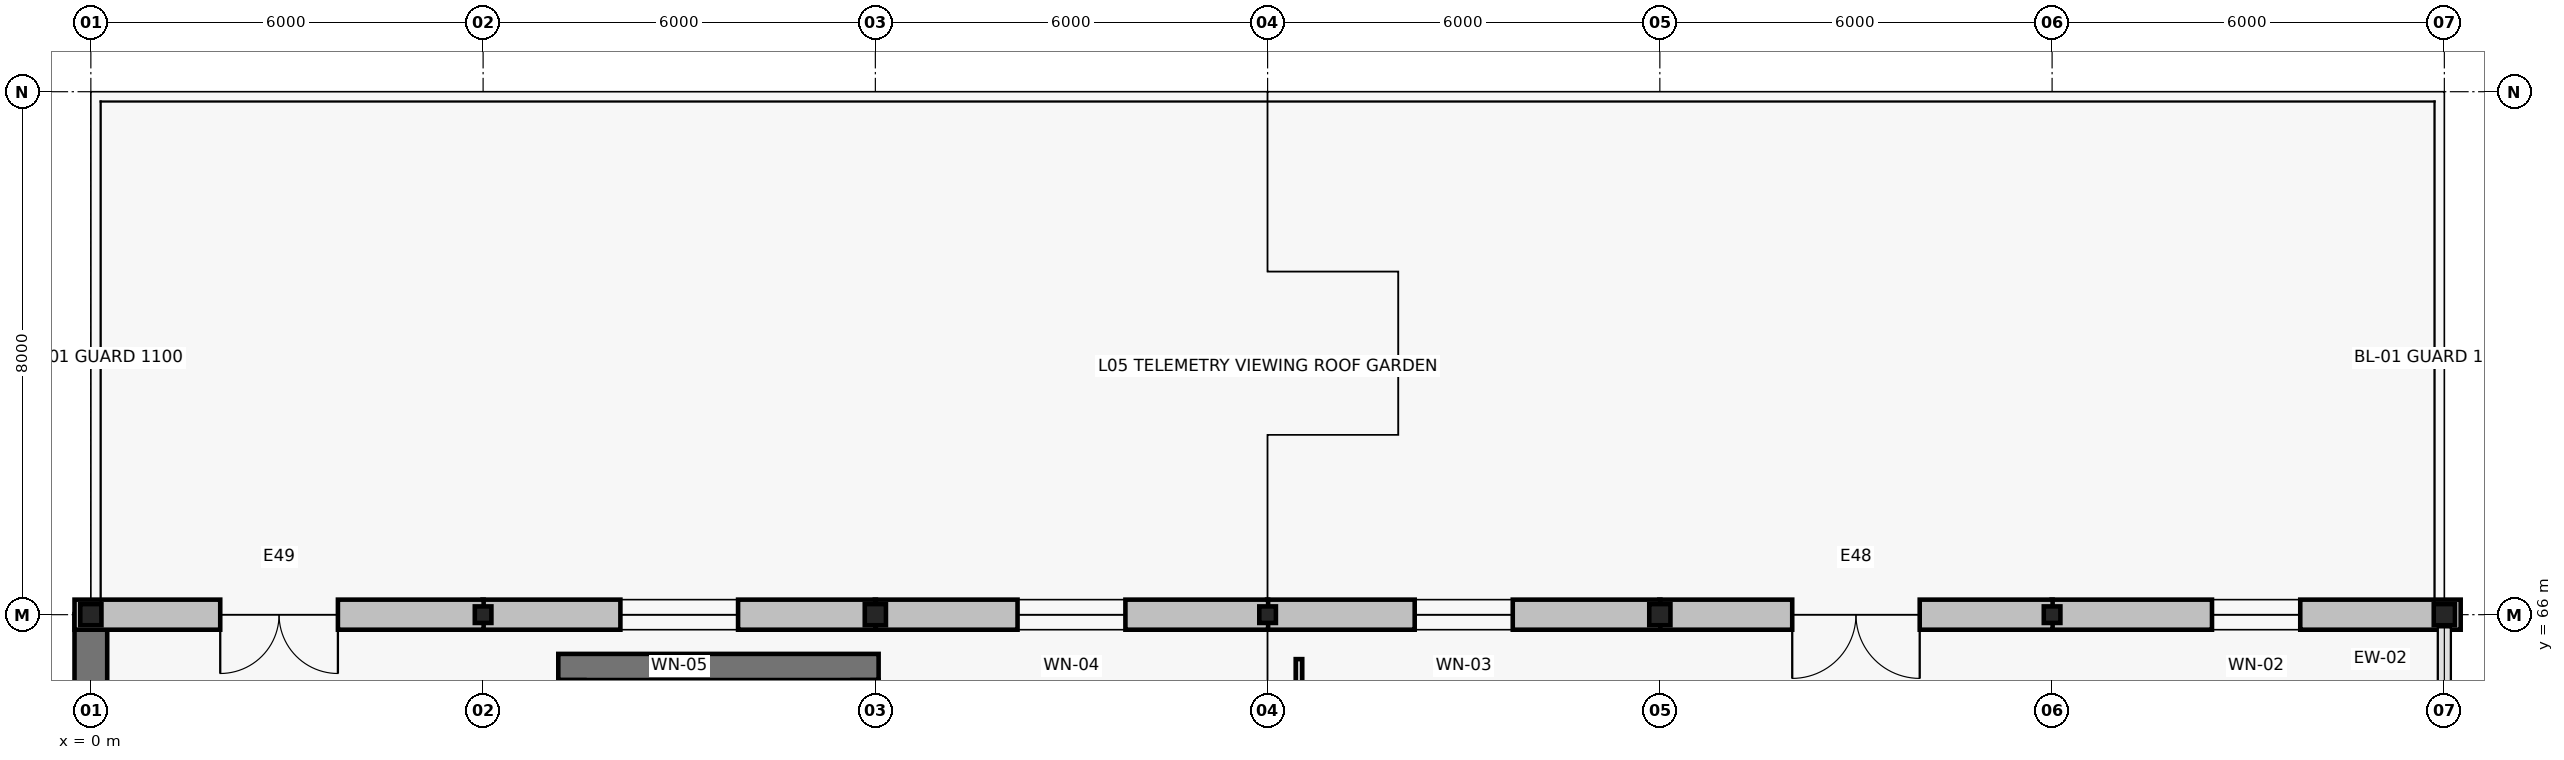
"""IFC4 building model, lengths in metres.
Left out: names, types, materials, properties, quantities, classifications, styles, units other than length and angle.
Written with IfcOpenShell. Run it as: python <this file> out.ifc"""

import sys

from ifc_helpers import new_model, si_unit, direction, frame, frame_2d, origin, origin_2d, place, context, subcontext, project, spatial, rectangle, hollow_circle, i_section, extrude, element, fill, save


model = new_model("IFC4")
c1 = context("Model", 3, precision=1e-05, world=origin(), true_north=direction((0.0, 1.0)))
c2 = subcontext(c1, "Body", "Model", "MODEL_VIEW")
j1 = project(units=[si_unit("LENGTHUNIT", "METRE"), si_unit("PLANEANGLEUNIT", "RADIAN")], contexts=[c1])
p1 = place(None, origin())
s1 = spatial("IfcSite", under=j1, at=p1, CompositionType="ELEMENT")
p2 = place(p1, origin())
s2 = spatial("IfcBuilding", under=s1, at=p2, CompositionType="ELEMENT")
p3 = place(p2, frame((0.0, 0.0, 19.4)))
s3 = spatial("IfcBuildingStorey", under=s2, at=p3, CompositionType="ELEMENT", Elevation=19.4)
p4 = place(p3, frame((0.0, 66.0, 0.0), z_axis=(0.0, 0.0, 1.0), x_axis=(1.0, 0.0, 0.0)))
e1 = element("IfcColumn", 1, at=p4, inside=s3, PredefinedType="COLUMN", context=c2, shape_type="SweptSolid", body=[
    extrude(hollow_circle(Radius=0.162, WallThickness=0.013, at=origin_2d()), origin(), (0.0, 0.0, 1.0), 4.2),
])
p5 = place(p3, frame((6.0, 66.0, 0.0), z_axis=(0.0, 0.0, 1.0), x_axis=(1.0, 0.0, 0.0)))
e2 = element("IfcColumn", 2, at=p5, inside=s3, PredefinedType="COLUMN", context=c2, shape_type="SweptSolid", body=[
    extrude(i_section(OverallWidth=0.254, OverallDepth=0.253, WebThickness=0.009, FlangeThickness=0.014, FilletRadius=0.012, at=origin_2d()), origin(), (0.0, 0.0, 1.0), 4.2),
])
p6 = place(p3, frame((12.0, 66.0, 0.0), z_axis=(0.0, 0.0, 1.0), x_axis=(1.0, 0.0, 0.0)))
e3 = element("IfcColumn", 3, at=p6, inside=s3, PredefinedType="COLUMN", context=c2, shape_type="SweptSolid", body=[
    extrude(hollow_circle(Radius=0.162, WallThickness=0.013, at=origin_2d()), origin(), (0.0, 0.0, 1.0), 4.2),
])
p7 = place(p3, frame((18.0, 66.0, 0.0), z_axis=(0.0, 0.0, 1.0), x_axis=(1.0, 0.0, 0.0)))
e4 = element("IfcColumn", 4, at=p7, inside=s3, PredefinedType="COLUMN", context=c2, shape_type="SweptSolid", body=[
    extrude(i_section(OverallWidth=0.254, OverallDepth=0.253, WebThickness=0.009, FlangeThickness=0.014, FilletRadius=0.012, at=origin_2d()), origin(), (0.0, 0.0, 1.0), 4.2),
])
p8 = place(p3, frame((24.0, 66.0, 0.0), z_axis=(0.0, 0.0, 1.0), x_axis=(1.0, 0.0, 0.0)))
e5 = element("IfcColumn", 5, at=p8, inside=s3, PredefinedType="COLUMN", context=c2, shape_type="SweptSolid", body=[
    extrude(hollow_circle(Radius=0.162, WallThickness=0.013, at=origin_2d()), origin(), (0.0, 0.0, 1.0), 4.2),
])
p9 = place(p3, frame((30.0, 66.0, 0.0), z_axis=(0.0, 0.0, 1.0), x_axis=(1.0, 0.0, 0.0)))
e6 = element("IfcColumn", 6, at=p9, inside=s3, PredefinedType="COLUMN", context=c2, shape_type="SweptSolid", body=[
    extrude(i_section(OverallWidth=0.254, OverallDepth=0.253, WebThickness=0.009, FlangeThickness=0.014, FilletRadius=0.012, at=origin_2d()), origin(), (0.0, 0.0, 1.0), 4.2),
])
p10 = place(p3, frame((36.0, 66.0, 0.0), z_axis=(0.0, 0.0, 1.0), x_axis=(1.0, 0.0, 0.0)))
e7 = element("IfcColumn", 7, at=p10, inside=s3, PredefinedType="COLUMN", context=c2, shape_type="SweptSolid", body=[
    extrude(hollow_circle(Radius=0.162, WallThickness=0.013, at=origin_2d()), origin(), (0.0, 0.0, 1.0), 4.2),
])
p11 = place(p3, frame((0.0, 4.492, 0.0), z_axis=(0.0, 0.0, 1.0), x_axis=(0.0, 1.0, 0.0)))
e8 = element("IfcWall", 8, at=p11, inside=s3, PredefinedType="SOLIDWALL", context=c2, shape_type="SweptSolid", body=[
    extrude(rectangle(XDim=61.516, YDim=0.5, at=frame_2d((30.758, 0.0))), origin(), (0.0, 0.0, 1.0), 3.88),
])
p12 = place(p3, frame((36.25, 66.0, 0.0), z_axis=(0.0, 0.0, 1.0), x_axis=(-1.0, 0.0, 0.0)))
e9 = element("IfcWall", 9, at=p12, inside=s3, PredefinedType="SOLIDWALL", context=c2, shape_type="SweptSolid", body=[
    extrude(rectangle(XDim=6.258, YDim=0.46, at=frame_2d((3.129, 0.0))), origin(), (0.0, 0.0, 1.0), 3.157),
])
p13 = place(p12, frame((2.454, 0.0, 0.9)))
e10 = element("IfcOpeningElement", 10, at=p13, cuts=e9, PredefinedType="OPENING", context=c2, shape_type="SweptSolid", body=[
    extrude(rectangle(XDim=1.35, YDim=1.8, at=frame_2d((0.675, 0.9))), frame((0.0, 0.245, 0.0), z_axis=(0.0, -1.0, 0.0), x_axis=(1.0, 0.0, 0.0)), (0.0, 0.0, 1.0), 0.49),
])
p14 = place(p3, frame((30.008, 66.0, 0.0), z_axis=(0.0, 0.0, 1.0), x_axis=(-1.0, 0.0, 0.0)))
e11 = element("IfcWall", 11, at=p14, inside=s3, PredefinedType="SOLIDWALL", context=c2, shape_type="SweptSolid", body=[
    extrude(rectangle(XDim=6.016, YDim=0.46, at=frame_2d((3.008, 0.0))), origin(), (0.0, 0.0, 1.0), 3.157),
])
p15 = place(p14, frame((2.033, 0.0, 0.0)))
e12 = element("IfcOpeningElement", 12, at=p15, cuts=e11, PredefinedType="OPENING", context=c2, shape_type="SweptSolid", body=[
    extrude(rectangle(XDim=1.95, YDim=2.3, at=frame_2d((0.975, 1.15))), frame((0.0, 0.245, 0.0), z_axis=(0.0, -1.0, 0.0), x_axis=(1.0, 0.0, 0.0)), (0.0, 0.0, 1.0), 0.49),
])
p16 = place(p3, frame((24.008, 66.0, 0.0), z_axis=(0.0, 0.0, 1.0), x_axis=(-1.0, 0.0, 0.0)))
e13 = element("IfcWall", 13, at=p16, inside=s3, PredefinedType="SOLIDWALL", context=c2, shape_type="SweptSolid", body=[
    extrude(rectangle(XDim=6.016, YDim=0.46, at=frame_2d((3.008, 0.0))), origin(), (0.0, 0.0, 1.0), 3.157),
])
p17 = place(p16, frame((2.258, 0.0, 0.9)))
e14 = element("IfcOpeningElement", 14, at=p17, cuts=e13, PredefinedType="OPENING", context=c2, shape_type="SweptSolid", body=[
    extrude(rectangle(XDim=1.5, YDim=1.8, at=frame_2d((0.75, 0.9))), frame((0.0, 0.245, 0.0), z_axis=(0.0, -1.0, 0.0), x_axis=(1.0, 0.0, 0.0)), (0.0, 0.0, 1.0), 0.49),
])
p18 = place(p3, frame((18.008, 66.0, 0.0), z_axis=(0.0, 0.0, 1.0), x_axis=(-1.0, 0.0, 0.0)))
e15 = element("IfcWall", 15, at=p18, inside=s3, PredefinedType="SOLIDWALL", context=c2, shape_type="SweptSolid", body=[
    extrude(rectangle(XDim=6.016, YDim=0.46, at=frame_2d((3.008, 0.0))), origin(), (0.0, 0.0, 1.0), 3.157),
])
p19 = place(p18, frame((2.183, 0.0, 0.9)))
e16 = element("IfcOpeningElement", 16, at=p19, cuts=e15, PredefinedType="OPENING", context=c2, shape_type="SweptSolid", body=[
    extrude(rectangle(XDim=1.65, YDim=1.8, at=frame_2d((0.825, 0.9))), frame((0.0, 0.245, 0.0), z_axis=(0.0, -1.0, 0.0), x_axis=(1.0, 0.0, 0.0)), (0.0, 0.0, 1.0), 0.49),
])
p20 = place(p3, frame((12.008, 66.0, 0.0), z_axis=(0.0, 0.0, 1.0), x_axis=(-1.0, 0.0, 0.0)))
e17 = element("IfcWall", 17, at=p20, inside=s3, PredefinedType="SOLIDWALL", context=c2, shape_type="SweptSolid", body=[
    extrude(rectangle(XDim=6.016, YDim=0.46, at=frame_2d((3.008, 0.0))), origin(), (0.0, 0.0, 1.0), 3.157),
])
p21 = place(p20, frame((2.108, 0.0, 0.9)))
e18 = element("IfcOpeningElement", 18, at=p21, cuts=e17, PredefinedType="OPENING", context=c2, shape_type="SweptSolid", body=[
    extrude(rectangle(XDim=1.8, YDim=1.8, at=frame_2d((0.9, 0.9))), frame((0.0, 0.245, 0.0), z_axis=(0.0, -1.0, 0.0), x_axis=(1.0, 0.0, 0.0)), (0.0, 0.0, 1.0), 0.49),
])
p22 = place(p3, frame((6.008, 66.0, 0.0), z_axis=(0.0, 0.0, 1.0), x_axis=(-1.0, 0.0, 0.0)))
e19 = element("IfcWall", 19, at=p22, inside=s3, PredefinedType="SOLIDWALL", context=c2, shape_type="SweptSolid", body=[
    extrude(rectangle(XDim=6.258, YDim=0.46, at=frame_2d((3.129, 0.0))), origin(), (0.0, 0.0, 1.0), 3.157),
])
p23 = place(p22, frame((2.229, 0.0, 0.0)))
e20 = element("IfcOpeningElement", 20, at=p23, cuts=e19, PredefinedType="OPENING", context=c2, shape_type="SweptSolid", body=[
    extrude(rectangle(XDim=1.8, YDim=2.25, at=frame_2d((0.9, 1.125))), frame((0.0, 0.245, 0.0), z_axis=(0.0, -1.0, 0.0), x_axis=(1.0, 0.0, 0.0)), (0.0, 0.0, 1.0), 0.49),
])
p24 = place(p3, frame((12.05, 65.2, 0.0), z_axis=(0.0, 0.0, 1.0), x_axis=(-1.0, 0.0, 0.0)))
e21 = element("IfcWall", 21, at=p24, inside=s3, PredefinedType="SHEAR", context=c2, shape_type="SweptSolid", body=[
    extrude(rectangle(XDim=4.9, YDim=0.4, at=frame_2d((2.45, 0.0))), origin(), (0.0, 0.0, 1.0), 3.95),
])
p25 = place(p3, frame((18.48, 32.91, 0.0), z_axis=(0.0, 0.0, 1.0), x_axis=(0.0, 1.0, 0.0)))
e22 = element("IfcWall", 22, at=p25, inside=s3, PredefinedType="PARTITIONING", context=c2, shape_type="SweptSolid", body=[
    extrude(rectangle(XDim=32.41, YDim=0.1, at=frame_2d((16.205, 0.0))), origin(), (0.0, 0.0, 1.0), 3.311),
])
p26 = place(p25, frame((20.287, 0.0, 0.0)))
e23 = element("IfcOpeningElement", 23, at=p26, cuts=e22, PredefinedType="OPENING", context=c2, shape_type="SweptSolid", body=[
    extrude(rectangle(XDim=1.2, YDim=2.15, at=frame_2d((0.6, 1.075))), frame((0.0, 0.065, 0.0), z_axis=(0.0, -1.0, 0.0), x_axis=(1.0, 0.0, 0.0)), (0.0, 0.0, 1.0), 0.13),
])
p27 = place(p13, origin())
e24 = element("IfcWindow", 24, at=p27, inside=s3, PartitioningType="SINGLE_PANEL", PredefinedType="WINDOW", context=c2, shape_type="SweptSolid", body=[
    extrude(rectangle(XDim=1.35, YDim=1.8, at=frame_2d((0.675, 0.9))), frame((0.0, 0.03, 0.0), z_axis=(0.0, -1.0, 0.0), x_axis=(1.0, 0.0, 0.0)), (0.0, 0.0, 1.0), 0.06),
])
fill(e10, e24)
p28 = place(p15, origin())
e25 = element("IfcDoor", 25, at=p28, inside=s3, OperationType="DOUBLE_DOOR_SINGLE_SWING", PredefinedType="DOOR", context=c2, shape_type="SweptSolid", body=[
    extrude(rectangle(XDim=1.95, YDim=2.3, at=frame_2d((0.975, 1.15))), frame((0.0, 0.025, 0.0), z_axis=(0.0, -1.0, 0.0), x_axis=(1.0, 0.0, 0.0)), (0.0, 0.0, 1.0), 0.05),
])
fill(e12, e25)
p29 = place(p17, origin())
e26 = element("IfcWindow", 26, at=p29, inside=s3, PartitioningType="SINGLE_PANEL", PredefinedType="WINDOW", context=c2, shape_type="SweptSolid", body=[
    extrude(rectangle(XDim=1.5, YDim=1.8, at=frame_2d((0.75, 0.9))), frame((0.0, 0.03, 0.0), z_axis=(0.0, -1.0, 0.0), x_axis=(1.0, 0.0, 0.0)), (0.0, 0.0, 1.0), 0.06),
])
fill(e14, e26)
p30 = place(p19, origin())
e27 = element("IfcWindow", 27, at=p30, inside=s3, PartitioningType="SINGLE_PANEL", PredefinedType="WINDOW", context=c2, shape_type="SweptSolid", body=[
    extrude(rectangle(XDim=1.65, YDim=1.8, at=frame_2d((0.825, 0.9))), frame((0.0, 0.03, 0.0), z_axis=(0.0, -1.0, 0.0), x_axis=(1.0, 0.0, 0.0)), (0.0, 0.0, 1.0), 0.06),
])
fill(e16, e27)
p31 = place(p21, origin())
e28 = element("IfcWindow", 28, at=p31, inside=s3, PartitioningType="SINGLE_PANEL", PredefinedType="WINDOW", context=c2, shape_type="SweptSolid", body=[
    extrude(rectangle(XDim=1.8, YDim=1.8, at=frame_2d((0.9, 0.9))), frame((0.0, 0.03, 0.0), z_axis=(0.0, -1.0, 0.0), x_axis=(1.0, 0.0, 0.0)), (0.0, 0.0, 1.0), 0.06),
])
fill(e18, e28)
p32 = place(p23, origin())
e29 = element("IfcDoor", 29, at=p32, inside=s3, OperationType="DOUBLE_DOOR_SINGLE_SWING", PredefinedType="DOOR", context=c2, shape_type="SweptSolid", body=[
    extrude(rectangle(XDim=1.8, YDim=2.25, at=frame_2d((0.9, 1.125))), frame((0.0, 0.025, 0.0), z_axis=(0.0, -1.0, 0.0), x_axis=(1.0, 0.0, 0.0)), (0.0, 0.0, 1.0), 0.05),
])
fill(e20, e29)
save(model, sys.argv[1])
